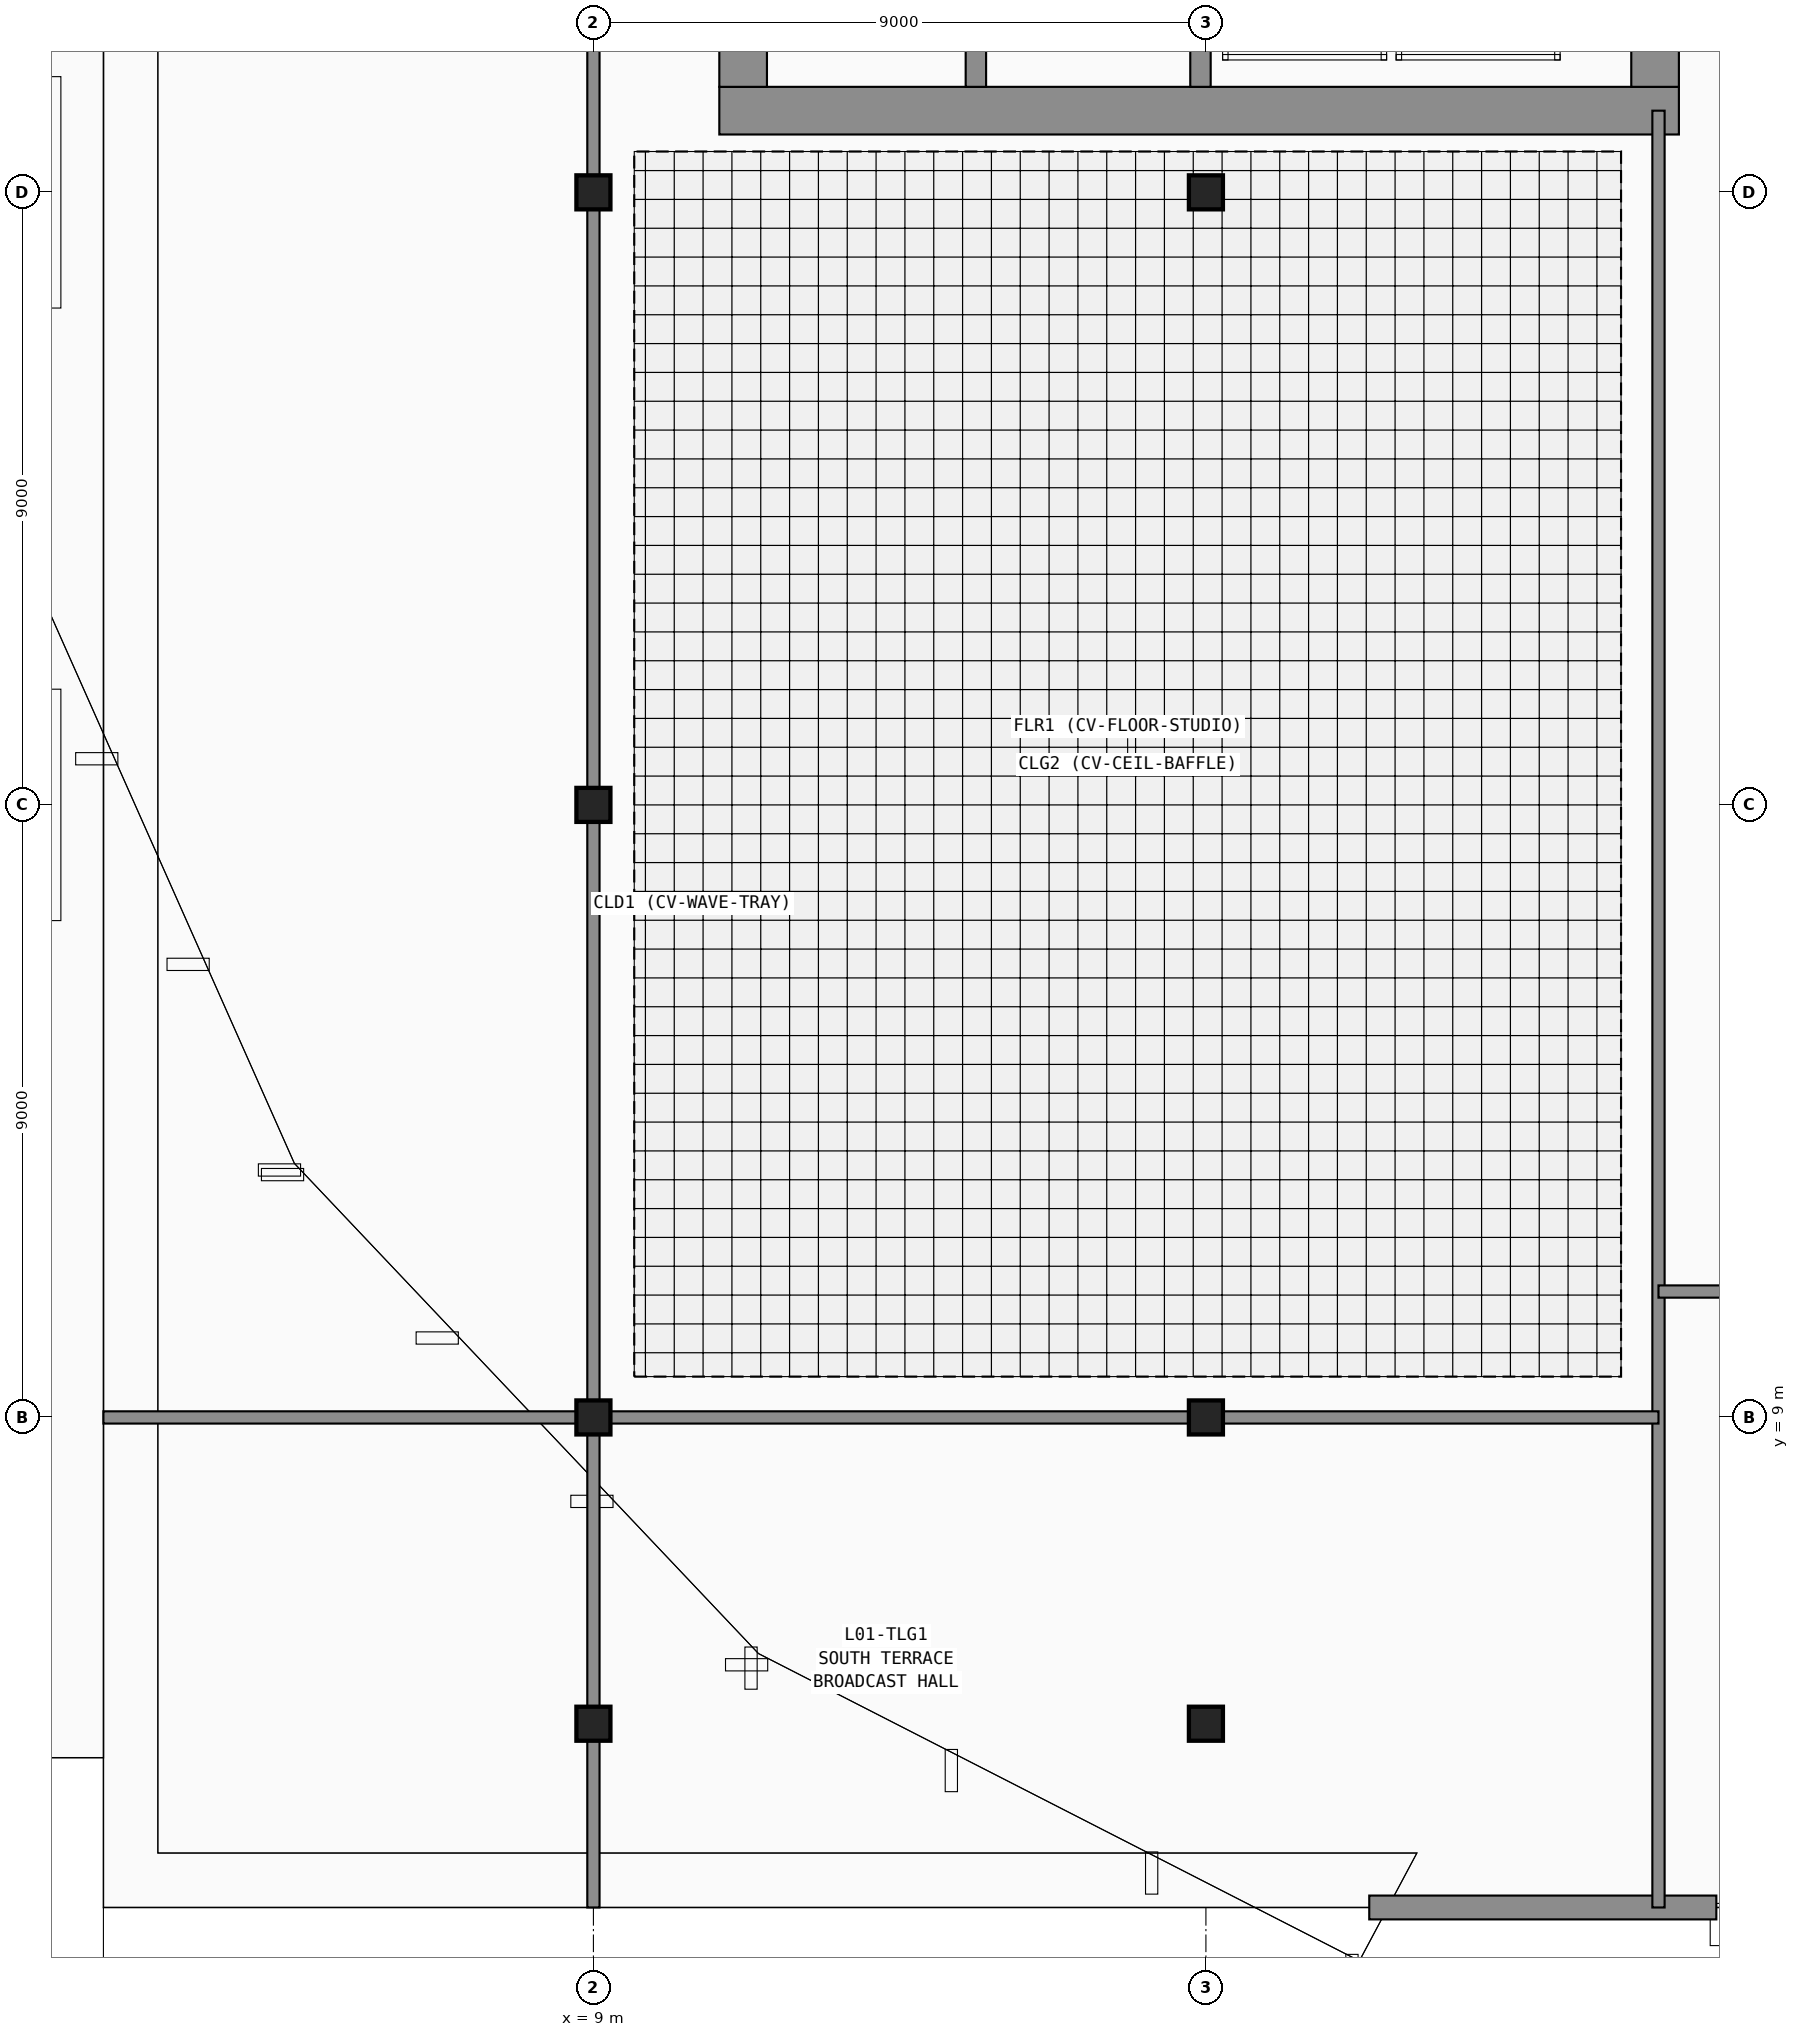
"""IFC4 building model, lengths in metres.
Left out: names, types, materials, properties, quantities, classifications, styles, units other than length and angle.
Written with IfcOpenShell. Run it as: python <this file> out.ifc"""

import sys

from ifc_helpers import new_model, si_unit, direction, frame, frame_2d, origin, origin_2d, place, context, subcontext, project, spatial, rectangle, i_section, extrude, element, fill, save


model = new_model("IFC4")
c1 = context("Model", 3, precision=1e-05, world=origin(), true_north=direction((0.0, 1.0)))
c2 = subcontext(c1, "Body", "Model", "MODEL_VIEW")
j1 = project(units=[si_unit("LENGTHUNIT", "METRE"), si_unit("PLANEANGLEUNIT", "RADIAN")], contexts=[c1])
p1 = place(None, origin())
s1 = spatial("IfcSite", under=j1, at=p1, CompositionType="ELEMENT")
p2 = place(p1, origin())
s2 = spatial("IfcBuilding", under=s1, at=p2, CompositionType="ELEMENT")
p3 = place(p2, frame((0.0, 0.0, 5.8)))
s3 = spatial("IfcBuildingStorey", under=s2, at=p3, CompositionType="ELEMENT", Elevation=5.8)
for number, where, z_axis, x_axis in (
    (1, (9.0, 9.0, 0.0), (0.0, 0.0, 1.0), (1.0, 0.0, 0.0)),
    (2, (9.0, 18.0, 0.0), (0.0, 0.0, 1.0), (1.0, 0.0, 0.0)),
    (3, (9.0, 27.0, 0.0), (0.0, 0.0, 1.0), (1.0, 0.0, 0.0)),
    (4, (18.0, 9.0, 0.0), (0.0, 0.0, 1.0), (1.0, 0.0, 0.0)),
    (5, (18.0, 27.0, 0.0), (0.0, 0.0, 1.0), (1.0, 0.0, 0.0)),
    (6, (9.0, 4.5, 0.0), (0.0, 0.0, 1.0), (1.0, 0.0, 0.0)),
    (7, (18.0, 4.5, 0.0), (0.0, 0.0, 1.0), (1.0, 0.0, 0.0)),
):
    element("IfcColumn", number, at=place(p3, frame(where, z_axis=z_axis, x_axis=x_axis)), inside=s3, PredefinedType="COLUMN", context=c2, shape_type="SweptSolid", body=[
        extrude(i_section(OverallWidth=0.442, OverallDepth=0.531, WebThickness=0.066, FlangeThickness=0.106, FilletRadius=0.015, at=origin_2d()), origin(), (0.0, 0.0, 1.0), 5.2),
    ])
p4 = place(p3, frame((25.5, 1.8, 0.0), z_axis=(0.0, 0.0, 1.0), x_axis=(-1.0, 0.0, 0.0)))
e8 = element("IfcWall", 8, at=p4, inside=s3, PredefinedType="SOLIDWALL", context=c2, shape_type="SweptSolid", body=[
    extrude(rectangle(XDim=5.1, YDim=0.35, at=frame_2d((2.55, 0.0))), origin(), (0.0, 0.0, 1.0), 4.88),
])
p5 = place(p3, frame((10.85, 28.2, 0.0), z_axis=(0.0, 0.0, 1.0), x_axis=(1.0, 0.0, 0.0)))
e9 = element("IfcWall", 9, at=p5, inside=s3, PredefinedType="SHEAR", context=c2, shape_type="SweptSolid", body=[
    extrude(rectangle(XDim=14.1, YDim=0.7, at=frame_2d((7.05, 0.0))), origin(), (0.0, 0.0, 1.0), 4.88),
])
p6 = place(p3, frame((11.2, 42.05, 0.0), z_axis=(0.0, 0.0, 1.0), x_axis=(0.0, -1.0, 0.0)))
e10 = element("IfcWall", 10, at=p6, inside=s3, PredefinedType="SHEAR", context=c2, shape_type="SweptSolid", body=[
    extrude(rectangle(XDim=13.5, YDim=0.7, at=frame_2d((6.75, 0.0))), origin(), (0.0, 0.0, 1.0), 4.88),
])
p7 = place(p3, frame((24.6, 28.55, 0.0), z_axis=(0.0, 0.0, 1.0), x_axis=(0.0, 1.0, 0.0)))
e11 = element("IfcWall", 11, at=p7, inside=s3, PredefinedType="SHEAR", context=c2, shape_type="SweptSolid", body=[
    extrude(rectangle(XDim=13.5, YDim=0.7, at=frame_2d((6.75, 0.0))), origin(), (0.0, 0.0, 1.0), 4.88),
])
p8 = place(p7, frame((3.25, 0.0, 0.0)))
e12 = element("IfcOpeningElement", 12, at=p8, cuts=e11, PredefinedType="OPENING", context=c2, shape_type="SweptSolid", body=[
    extrude(rectangle(XDim=1.5, YDim=2.2, at=frame_2d((0.75, 1.1))), frame((0.0, 0.36, 0.0), z_axis=(0.0, -1.0, 0.0), x_axis=(1.0, 0.0, 0.0)), (0.0, 0.0, 1.0), 0.72),
])
p9 = place(p7, frame((9.85, 0.0, 0.0)))
e13 = element("IfcOpeningElement", 13, at=p9, cuts=e11, PredefinedType="OPENING", context=c2, shape_type="SweptSolid", body=[
    extrude(rectangle(XDim=0.9, YDim=2.1, at=frame_2d((0.45, 1.05))), frame((0.0, 0.36, 0.0), z_axis=(0.0, -1.0, 0.0), x_axis=(1.0, 0.0, 0.0)), (0.0, 0.0, 1.0), 0.72),
])
p10 = place(p3, frame((14.62, 28.55, 0.0), z_axis=(0.0, 0.0, 1.0), x_axis=(0.0, 1.0, 0.0)))
e14 = element("IfcWall", 14, at=p10, inside=s3, PredefinedType="SHEAR", context=c2, shape_type="SweptSolid", body=[
    extrude(rectangle(XDim=8.9, YDim=0.3, at=frame_2d((4.45, 0.0))), origin(), (0.0, 0.0, 1.0), 4.88),
])
p11 = place(p3, frame((17.92, 42.05, 0.0), z_axis=(0.0, 0.0, 1.0), x_axis=(0.0, -1.0, 0.0)))
e15 = element("IfcWall", 15, at=p11, inside=s3, PredefinedType="SHEAR", context=c2, shape_type="SweptSolid", body=[
    extrude(rectangle(XDim=13.5, YDim=0.3, at=frame_2d((6.75, 0.0))), origin(), (0.0, 0.0, 1.0), 4.88),
])
p12 = place(p11, frame((1.875, 0.0, 0.0)))
e16 = element("IfcOpeningElement", 16, at=p12, cuts=e15, PredefinedType="OPENING", context=c2, shape_type="SweptSolid", body=[
    extrude(rectangle(XDim=1.15, YDim=2.15, at=frame_2d((0.575, 1.075))), frame((0.0, 0.16, 0.0), z_axis=(0.0, -1.0, 0.0), x_axis=(1.0, 0.0, 0.0)), (0.0, 0.0, 1.0), 0.32),
])
p13 = place(p3, frame((24.65, 1.8, 0.0), z_axis=(0.0, 0.0, 1.0), x_axis=(0.0, 1.0, 0.0)))
e17 = element("IfcWall", 17, at=p13, inside=s3, PredefinedType="PARTITIONING", context=c2, shape_type="SweptSolid", body=[
    extrude(rectangle(XDim=26.4, YDim=0.18, at=frame_2d((13.2, 0.0))), origin(), (0.0, 0.0, 1.0), 3.912),
])
p14 = place(p13, frame((12.2, 0.0, 0.0)))
e18 = element("IfcOpeningElement", 18, at=p14, cuts=e17, PredefinedType="OPENING", context=c2, shape_type="SweptSolid", body=[
    extrude(rectangle(XDim=1.4, YDim=2.15, at=frame_2d((0.7, 1.075))), frame((0.0, 0.1, 0.0), z_axis=(0.0, -1.0, 0.0), x_axis=(1.0, 0.0, 0.0)), (0.0, 0.0, 1.0), 0.2),
])
p15 = place(p3, frame((24.65, 10.85, 0.0), z_axis=(0.0, 0.0, 1.0), x_axis=(1.0, 0.0, 0.0)))
e19 = element("IfcWall", 19, at=p15, inside=s3, PredefinedType="PARTITIONING", context=c2, shape_type="SweptSolid", body=[
    extrude(rectangle(XDim=38.35, YDim=0.18, at=frame_2d((19.175, 0.0))), origin(), (0.0, 0.0, 1.0), 4.005),
])
p16 = place(p15, frame((2.0, 0.0, 0.0)))
e20 = element("IfcOpeningElement", 20, at=p16, cuts=e19, PredefinedType="OPENING", context=c2, shape_type="SweptSolid", body=[
    extrude(rectangle(XDim=1.2, YDim=2.15, at=frame_2d((0.6, 1.075))), frame((0.0, 0.1, 0.0), z_axis=(0.0, -1.0, 0.0), x_axis=(1.0, 0.0, 0.0)), (0.0, 0.0, 1.0), 0.2),
])
p17 = place(p3, frame((9.0, 1.8, 0.0), z_axis=(0.0, 0.0, 1.0), x_axis=(0.0, 1.0, 0.0)))
e21 = element("IfcWall", 21, at=p17, inside=s3, PredefinedType="PARTITIONING", context=c2, shape_type="SweptSolid", body=[
    extrude(rectangle(XDim=52.2, YDim=0.18, at=frame_2d((26.1, 0.0))), origin(), (0.0, 0.0, 1.0), 3.912),
])
p18 = place(p17, frame((12.2, 0.0, 0.0)))
e22 = element("IfcOpeningElement", 22, at=p18, cuts=e21, PredefinedType="OPENING", context=c2, shape_type="SweptSolid", body=[
    extrude(rectangle(XDim=1.2, YDim=2.15, at=frame_2d((0.6, 1.075))), frame((0.0, 0.1, 0.0), z_axis=(0.0, -1.0, 0.0), x_axis=(1.0, 0.0, 0.0)), (0.0, 0.0, 1.0), 0.2),
])
p19 = place(p3, frame((1.8, 9.0, 0.0), z_axis=(0.0, 0.0, 1.0), x_axis=(1.0, 0.0, 0.0)))
e23 = element("IfcWall", 23, at=p19, inside=s3, PredefinedType="PARTITIONING", context=c2, shape_type="SweptSolid", body=[
    extrude(rectangle(XDim=22.85, YDim=0.18, at=frame_2d((11.425, 0.0))), origin(), (0.0, 0.0, 1.0), 3.933),
])
p20 = place(p19, frame((11.7, 0.0, 0.0)))
e24 = element("IfcOpeningElement", 24, at=p20, cuts=e23, PredefinedType="OPENING", context=c2, shape_type="SweptSolid", body=[
    extrude(rectangle(XDim=1.0, YDim=2.1, at=frame_2d((0.5, 1.05))), frame((0.0, 0.1, 0.0), z_axis=(0.0, -1.0, 0.0), x_axis=(1.0, 0.0, 0.0)), (0.0, 0.0, 1.0), 0.2),
])
p21 = place(p14, origin())
e25 = element("IfcDoor", 25, at=p21, inside=s3, OperationType="DOUBLE_DOOR_SINGLE_SWING", PredefinedType="DOOR", context=c2, shape_type="SweptSolid", body=[
    extrude(rectangle(XDim=1.4, YDim=2.15, at=frame_2d((0.7, 1.075))), frame((0.0, 0.025, 0.0), z_axis=(0.0, -1.0, 0.0), x_axis=(1.0, 0.0, 0.0)), (0.0, 0.0, 1.0), 0.05),
])
fill(e18, e25)
p22 = place(p18, origin())
e26 = element("IfcDoor", 26, at=p22, inside=s3, OperationType="SINGLE_SWING_LEFT", PredefinedType="DOOR", context=c2, shape_type="SweptSolid", body=[
    extrude(rectangle(XDim=1.2, YDim=2.15, at=frame_2d((0.6, 1.075))), frame((0.0, 0.025, 0.0), z_axis=(0.0, -1.0, 0.0), x_axis=(1.0, 0.0, 0.0)), (0.0, 0.0, 1.0), 0.05),
])
fill(e22, e26)
p23 = place(p20, origin())
e27 = element("IfcDoor", 27, at=p23, inside=s3, OperationType="SINGLE_SWING_LEFT", PredefinedType="DOOR", context=c2, shape_type="SweptSolid", body=[
    extrude(rectangle(XDim=1.0, YDim=2.1, at=frame_2d((0.5, 1.05))), frame((0.0, 0.025, 0.0), z_axis=(0.0, -1.0, 0.0), x_axis=(1.0, 0.0, 0.0)), (0.0, 0.0, 1.0), 0.05),
])
fill(e24, e27)
save(model, sys.argv[1])
